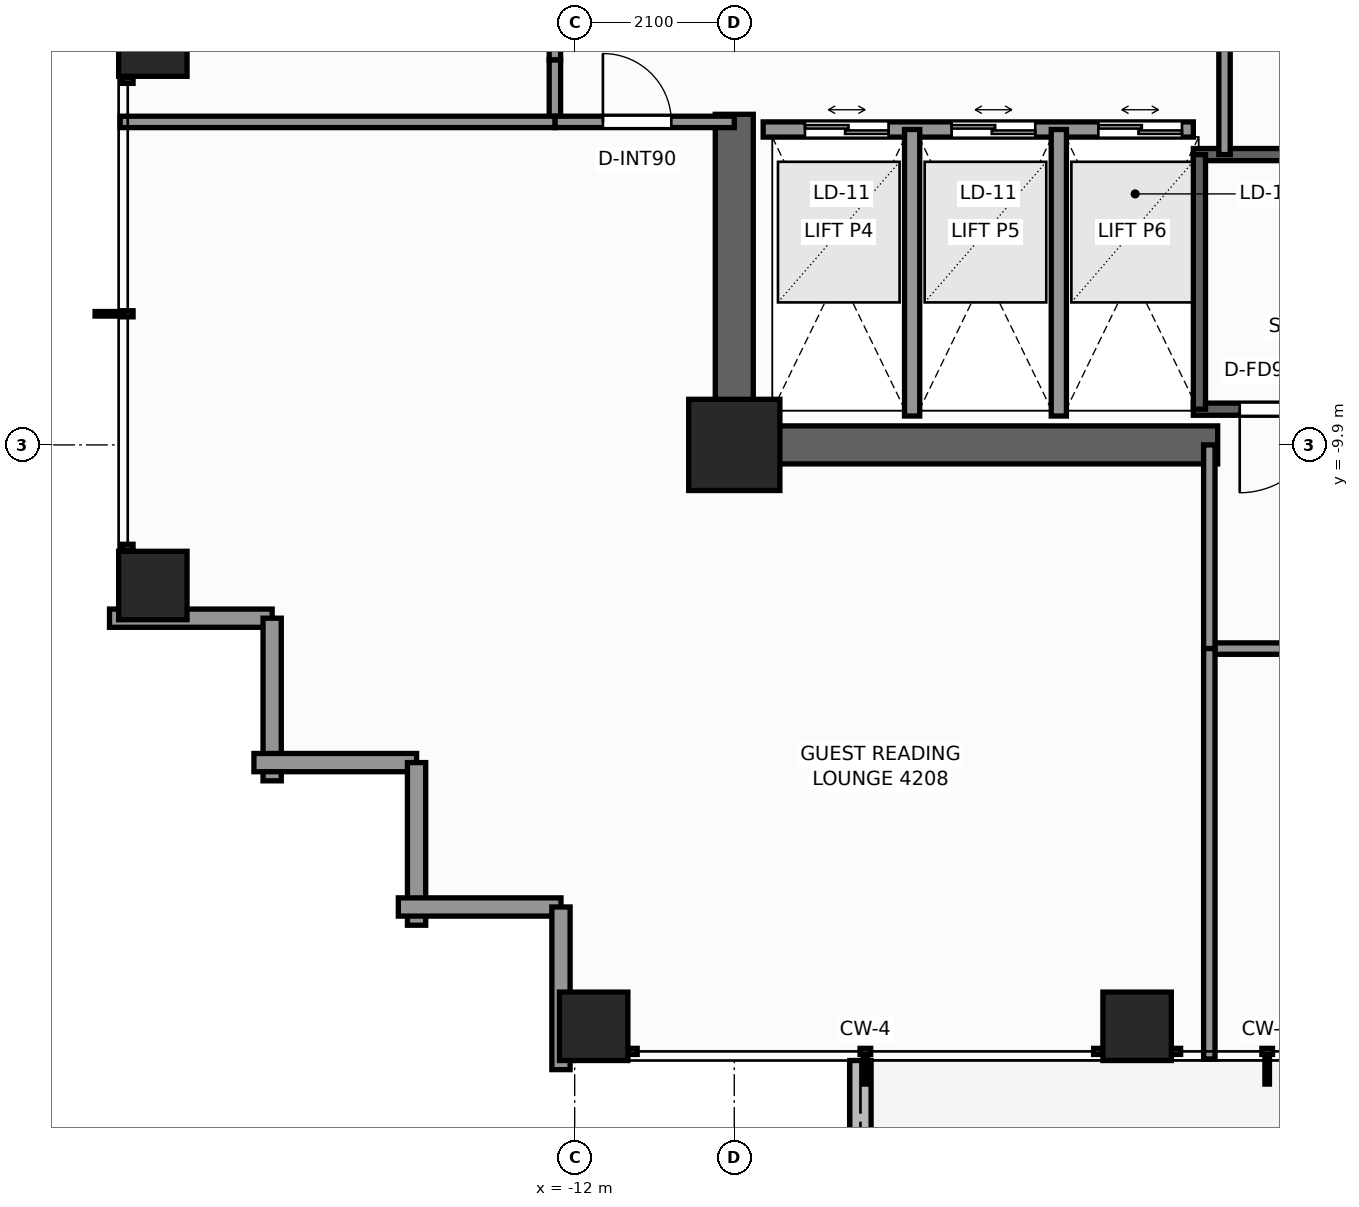
"""IFC4 building model, lengths in metres.
Left out: names, types, materials, properties, quantities, classifications, styles, units other than length and angle.
Written with IfcOpenShell. Run it as: python <this file> out.ifc"""

import sys

from ifc_helpers import new_model, si_unit, direction, frame, frame_2d, origin, origin_2d, place, context, subcontext, project, spatial, rectangle, extrude, element, fill, save


model = new_model("IFC4")
c1 = context("Model", 3, precision=1e-05, world=origin(), true_north=direction((0.0, 1.0)))
c2 = subcontext(c1, "Body", "Model", "MODEL_VIEW")
j1 = project(units=[si_unit("LENGTHUNIT", "METRE"), si_unit("PLANEANGLEUNIT", "RADIAN")], contexts=[c1])
p1 = place(None, origin())
s1 = spatial("IfcSite", under=j1, at=p1, CompositionType="ELEMENT")
p2 = place(p1, origin())
s2 = spatial("IfcBuilding", under=s1, at=p2, CompositionType="ELEMENT")
p3 = place(p2, frame((0.0, 0.0, 144.8)))
s3 = spatial("IfcBuildingStorey", under=s2, at=p3, CompositionType="ELEMENT", Elevation=144.8)
p4 = place(p3, frame((-3.54, -9.9, 0.0), z_axis=(0.0, 0.0, 1.0), x_axis=(-1.0, 0.0, 0.0)))
e1 = element("IfcWall", 1, at=p4, inside=s3, PredefinedType="SHEAR", context=c2, shape_type="SweptSolid", body=[
    extrude(rectangle(XDim=6.61, YDim=0.5, at=frame_2d((3.305, 0.0))), origin(), (0.0, 0.0, 1.0), 3.3),
])
p5 = place(p3, frame((-9.9, -9.65, 0.0), z_axis=(0.0, 0.0, 1.0), x_axis=(0.0, 1.0, 0.0)))
e2 = element("IfcWall", 2, at=p5, inside=s3, PredefinedType="SHEAR", context=c2, shape_type="SweptSolid", body=[
    extrude(rectangle(XDim=4.1, YDim=0.5, at=frame_2d((2.05, 0.0))), origin(), (0.0, 0.0, 1.0), 3.3),
])
p6 = place(p3, frame((-9.9, -9.9, 0.0), z_axis=(0.0, 0.0, 1.0), x_axis=(1.0, 0.0, 0.0)))
e3 = element("IfcColumn", 3, at=p6, inside=s3, PredefinedType="COLUMN", context=c2, shape_type="SweptSolid", body=[
    extrude(rectangle(XDim=1.2, YDim=1.2, at=origin_2d()), origin(), (0.0, 0.0, 1.0), 3.3),
])
for number, where, z_axis, x_axis in (
    (4, (-11.75, -17.55, 0.0), (0.0, 0.0, 1.0), (1.0, 0.0, 0.0)),
    (5, (-4.6, -17.55, 0.0), (0.0, 0.0, 1.0), (1.0, 0.0, 0.0)),
    (6, (-17.55, -11.75, 0.0), (0.0, 0.0, 1.0), (1.0, 0.0, 0.0)),
    (7, (-17.55, -4.6, 0.0), (0.0, 0.0, 1.0), (1.0, 0.0, 0.0)),
):
    element("IfcColumn", number, at=place(p3, frame(where, z_axis=z_axis, x_axis=x_axis)), inside=s3, PredefinedType="COLUMN", context=c2, shape_type="SweptSolid", body=[
        extrude(rectangle(XDim=0.9, YDim=0.9, at=origin_2d()), origin(), (0.0, 0.0, 1.0), 3.3),
    ])
p7 = place(p3, frame((-8.24, -18.0, -0.02), z_axis=(0.0, 0.0, 1.0), x_axis=(0.0, -1.0, 0.0)))
e8 = element("IfcWall", 8, at=p7, inside=s3, PredefinedType="PARAPET", context=c2, shape_type="SweptSolid", body=[
    extrude(rectangle(XDim=1.466, YDim=0.28, at=frame_2d((0.733, 0.0))), origin(), (0.0, 0.0, 1.0), 0.42),
])
for number, where, z_axis, x_axis in (
    (9, (-15.98, -12.18, 0.0), (0.0, 0.0, 1.0), (-1.0, 0.0, 0.0)),
    (10, (-15.98, -14.32, 0.0), (0.0, 0.0, 1.0), (0.0, 1.0, 0.0)),
):
    element("IfcWall", number, at=place(p3, frame(where, z_axis=z_axis, x_axis=x_axis)), inside=s3, PredefinedType="STANDARD", context=c2, shape_type="SweptSolid", body=[
        extrude(rectangle(XDim=2.14, YDim=0.24, at=frame_2d((1.07, 0.0))), origin(), (0.0, 0.0, 1.0), 2.329),
    ])
for number, where, z_axis, x_axis in (
    (11, (-14.08, -14.08, 0.0), (0.0, 0.0, 1.0), (-1.0, 0.0, 0.0)),
    (12, (-14.08, -16.22, 0.0), (0.0, 0.0, 1.0), (0.0, 1.0, 0.0)),
):
    element("IfcWall", number, at=place(p3, frame(where, z_axis=z_axis, x_axis=x_axis)), inside=s3, PredefinedType="STANDARD", context=c2, shape_type="SweptSolid", body=[
        extrude(rectangle(XDim=2.14, YDim=0.24, at=frame_2d((1.07, 0.0))), origin(), (0.0, 0.0, 1.0), 2.329),
    ])
for number, where, z_axis, x_axis in (
    (13, (-12.18, -15.98, 0.0), (0.0, 0.0, 1.0), (-1.0, 0.0, 0.0)),
    (14, (-12.18, -18.12, 0.0), (0.0, 0.0, 1.0), (0.0, 1.0, 0.0)),
):
    element("IfcWall", number, at=place(p3, frame(where, z_axis=z_axis, x_axis=x_axis)), inside=s3, PredefinedType="STANDARD", context=c2, shape_type="SweptSolid", body=[
        extrude(rectangle(XDim=2.14, YDim=0.24, at=frame_2d((1.07, 0.0))), origin(), (0.0, 0.0, 1.0), 2.329),
    ])
p8 = place(p3, frame((3.86, -9.43, 0.0), z_axis=(0.0, 0.0, 1.0), x_axis=(-1.0, 0.0, 0.0)))
e15 = element("IfcWall", 15, at=p8, inside=s3, PredefinedType="SHEAR", context=c2, shape_type="SweptSolid", body=[
    extrude(rectangle(XDim=7.72, YDim=0.16, at=frame_2d((3.86, 0.0))), origin(), (0.0, 0.0, 1.0), 3.3),
])
p9 = place(p8, frame((6.01, 0.0, 0.0)))
e16 = element("IfcOpeningElement", 16, at=p9, cuts=e15, PredefinedType="OPENING", context=c2, shape_type="SweptSolid", body=[
    extrude(rectangle(XDim=1.1, YDim=2.2, at=frame_2d((0.55, 1.1))), frame((0.0, 0.09, 0.0), z_axis=(0.0, -1.0, 0.0), x_axis=(1.0, 0.0, 0.0)), (0.0, 0.0, 1.0), 0.18),
])
p10 = place(p3, frame((-3.86, -6.08, 0.0), z_axis=(0.0, 0.0, 1.0), x_axis=(1.0, 0.0, 0.0)))
e17 = element("IfcWall", 17, at=p10, inside=s3, PredefinedType="SHEAR", context=c2, shape_type="SweptSolid", body=[
    extrude(rectangle(XDim=7.72, YDim=0.16, at=frame_2d((3.86, 0.0))), origin(), (0.0, 0.0, 1.0), 3.3),
])
p11 = place(p3, frame((-3.78, -9.43, 0.0), z_axis=(0.0, 0.0, 1.0), x_axis=(0.0, 1.0, 0.0)))
e18 = element("IfcWall", 18, at=p11, inside=s3, PredefinedType="SHEAR", context=c2, shape_type="SweptSolid", body=[
    extrude(rectangle(XDim=3.35, YDim=0.16, at=frame_2d((1.675, 0.0))), origin(), (0.0, 0.0, 1.0), 3.3),
])
p12 = place(p3, frame((-9.52, -5.75, 0.0), z_axis=(0.0, 0.0, 1.0), x_axis=(1.0, 0.0, 0.0)))
e19 = element("IfcWall", 19, at=p12, inside=s3, PredefinedType="SOLIDWALL", context=c2, shape_type="SweptSolid", body=[
    extrude(rectangle(XDim=5.66, YDim=0.2, at=frame_2d((2.83, 0.0))), origin(), (0.0, 0.0, 1.0), 2.95),
])
p13 = place(p12, frame((0.55, 0.0, 0.0)))
e20 = element("IfcOpeningElement", 20, at=p13, cuts=e19, PredefinedType="OPENING", context=c2, shape_type="SweptSolid", body=[
    extrude(rectangle(XDim=1.1, YDim=2.2, at=frame_2d((0.55, 1.1))), frame((0.0, 0.11, 0.0), z_axis=(0.0, -1.0, 0.0), x_axis=(1.0, 0.0, 0.0)), (0.0, 0.0, 1.0), 0.22),
])
p14 = place(p12, frame((2.48, 0.0, 0.0)))
e21 = element("IfcOpeningElement", 21, at=p14, cuts=e19, PredefinedType="OPENING", context=c2, shape_type="SweptSolid", body=[
    extrude(rectangle(XDim=1.1, YDim=2.2, at=frame_2d((0.55, 1.1))), frame((0.0, 0.11, 0.0), z_axis=(0.0, -1.0, 0.0), x_axis=(1.0, 0.0, 0.0)), (0.0, 0.0, 1.0), 0.22),
])
p15 = place(p12, frame((4.41, 0.0, 0.0)))
e22 = element("IfcOpeningElement", 22, at=p15, cuts=e19, PredefinedType="OPENING", context=c2, shape_type="SweptSolid", body=[
    extrude(rectangle(XDim=1.1, YDim=2.2, at=frame_2d((0.55, 1.1))), frame((0.0, 0.11, 0.0), z_axis=(0.0, -1.0, 0.0), x_axis=(1.0, 0.0, 0.0)), (0.0, 0.0, 1.0), 0.22),
])
for number, where, z_axis, x_axis in (
    (23, (-7.56, -9.52, 0.0), (0.0, 0.0, 1.0), (0.0, 1.0, 0.0)),
    (24, (-5.63, -9.52, 0.0), (0.0, 0.0, 1.0), (0.0, 1.0, 0.0)),
):
    element("IfcWall", number, at=place(p3, frame(where, z_axis=z_axis, x_axis=x_axis)), inside=s3, PredefinedType="SOLIDWALL", context=c2, shape_type="SweptSolid", body=[
        extrude(rectangle(XDim=3.77, YDim=0.2, at=frame_2d((1.885, 0.0))), origin(), (0.0, 0.0, 1.0), 2.95),
    ])
p16 = place(p3, frame((-3.45, -6.08, 0.0), z_axis=(0.0, 0.0, 1.0), x_axis=(0.0, 1.0, 0.0)))
e25 = element("IfcWall", 25, at=p16, inside=s3, PredefinedType="PARTITIONING", context=c2, shape_type="SweptSolid", body=[
    extrude(rectangle(XDim=2.36, YDim=0.15, at=frame_2d((1.18, 0.0))), origin(), (0.0, 0.0, 1.0), 2.95),
])
p17 = place(p3, frame((-3.65, -12.58, 0.0), z_axis=(0.0, 0.0, 1.0), x_axis=(1.0, 0.0, 0.0)))
e26 = element("IfcWall", 26, at=p17, inside=s3, PredefinedType="PARTITIONING", context=c2, shape_type="SweptSolid", body=[
    extrude(rectangle(XDim=8.017, YDim=0.15, at=frame_2d((4.009, 0.0))), origin(), (0.0, 0.0, 1.0), 2.475),
])
p18 = place(p17, frame((5.205, 0.0, 0.0)))
e27 = element("IfcOpeningElement", 27, at=p18, cuts=e26, PredefinedType="OPENING", context=c2, shape_type="SweptSolid", body=[
    extrude(rectangle(XDim=0.95, YDim=2.06, at=frame_2d((0.475, 1.03))), frame((0.0, 0.085, 0.0), z_axis=(0.0, -1.0, 0.0), x_axis=(1.0, 0.0, 0.0)), (0.0, 0.0, 1.0), 0.17),
])
p19 = place(p3, frame((-3.65, -12.58, 0.0), z_axis=(0.0, 0.0, 1.0), x_axis=(0.0, 1.0, 0.0)))
e28 = element("IfcWall", 28, at=p19, inside=s3, PredefinedType="PARTITIONING", context=c2, shape_type="SweptSolid", body=[
    extrude(rectangle(XDim=2.68, YDim=0.15, at=frame_2d((1.34, 0.0))), origin(), (0.0, 0.0, 1.0), 2.95),
])
p20 = place(p3, frame((-12.26, -5.65, 0.0), z_axis=(0.0, 0.0, 1.0), x_axis=(0.0, 1.0, 0.0)))
e29 = element("IfcWall", 29, at=p20, inside=s3, PredefinedType="PARTITIONING", context=c2, shape_type="SweptSolid", body=[
    extrude(rectangle(XDim=0.817, YDim=0.15, at=frame_2d((0.409, 0.0))), origin(), (0.0, 0.0, 1.0), 2.95),
])
p21 = place(p3, frame((-12.26, -4.833, 0.0), z_axis=(0.0, 0.0, 1.0), x_axis=(0.0, 1.0, 0.0)))
e30 = element("IfcWall", 30, at=p21, inside=s3, PredefinedType="PARTITIONING", context=c2, shape_type="SweptSolid", body=[
    extrude(rectangle(XDim=0.465, YDim=0.15, at=frame_2d((0.232, 0.0))), origin(), (0.0, 0.0, 1.0), 2.162),
])
p22 = place(p3, frame((-12.26, -5.65, 0.0), z_axis=(0.0, 0.0, 1.0), x_axis=(1.0, 0.0, 0.0)))
e31 = element("IfcWall", 31, at=p22, inside=s3, PredefinedType="PARTITIONING", context=c2, shape_type="SweptSolid", body=[
    extrude(rectangle(XDim=2.36, YDim=0.15, at=frame_2d((1.18, 0.0))), origin(), (0.0, 0.0, 1.0), 2.95),
])
p23 = place(p22, frame((0.632, 0.0, 0.0)))
e32 = element("IfcOpeningElement", 32, at=p23, cuts=e31, PredefinedType="OPENING", context=c2, shape_type="SweptSolid", body=[
    extrude(rectangle(XDim=0.9, YDim=2.06, at=frame_2d((0.45, 1.03))), frame((0.0, 0.085, 0.0), z_axis=(0.0, -1.0, 0.0), x_axis=(1.0, 0.0, 0.0)), (0.0, 0.0, 1.0), 0.17),
])
p24 = place(p3, frame((-17.98, -5.65, 0.0), z_axis=(0.0, 0.0, 1.0), x_axis=(1.0, 0.0, 0.0)))
e33 = element("IfcWall", 33, at=p24, inside=s3, PredefinedType="PARTITIONING", context=c2, shape_type="SweptSolid", body=[
    extrude(rectangle(XDim=5.72, YDim=0.15, at=frame_2d((2.86, 0.0))), origin(), (0.0, 0.0, 1.0), 2.319),
])
p25 = place(p3, frame((-3.65, -17.98, 0.0), z_axis=(0.0, 0.0, 1.0), x_axis=(0.0, 1.0, 0.0)))
e34 = element("IfcWall", 34, at=p25, inside=s3, PredefinedType="PARTITIONING", context=c2, shape_type="SweptSolid", body=[
    extrude(rectangle(XDim=5.4, YDim=0.15, at=frame_2d((2.7, 0.0))), origin(), (0.0, 0.0, 1.0), 2.319),
])
p26 = place(p9, origin())
e35 = element("IfcDoor", 35, at=p26, inside=s3, OperationType="SINGLE_SWING_RIGHT", PredefinedType="DOOR", context=c2, shape_type="SweptSolid", body=[
    extrude(rectangle(XDim=1.1, YDim=2.2, at=frame_2d((0.55, 1.1))), frame((0.0, 0.025, 0.0), z_axis=(0.0, -1.0, 0.0), x_axis=(1.0, 0.0, 0.0)), (0.0, 0.0, 1.0), 0.05),
])
fill(e16, e35)
p27 = place(p13, origin())
e36 = element("IfcDoor", 36, at=p27, inside=s3, OperationType="DOUBLE_DOOR_SLIDING", PredefinedType="DOOR", context=c2, shape_type="SweptSolid", body=[
    extrude(rectangle(XDim=1.1, YDim=2.2, at=frame_2d((0.55, 1.1))), frame((0.0, 0.025, 0.0), z_axis=(0.0, -1.0, 0.0), x_axis=(1.0, 0.0, 0.0)), (0.0, 0.0, 1.0), 0.05),
])
fill(e20, e36)
p28 = place(p14, origin())
e37 = element("IfcDoor", 37, at=p28, inside=s3, OperationType="DOUBLE_DOOR_SLIDING", PredefinedType="DOOR", context=c2, shape_type="SweptSolid", body=[
    extrude(rectangle(XDim=1.1, YDim=2.2, at=frame_2d((0.55, 1.1))), frame((0.0, 0.025, 0.0), z_axis=(0.0, -1.0, 0.0), x_axis=(1.0, 0.0, 0.0)), (0.0, 0.0, 1.0), 0.05),
])
fill(e21, e37)
p29 = place(p15, origin())
e38 = element("IfcDoor", 38, at=p29, inside=s3, OperationType="DOUBLE_DOOR_SLIDING", PredefinedType="DOOR", context=c2, shape_type="SweptSolid", body=[
    extrude(rectangle(XDim=1.1, YDim=2.2, at=frame_2d((0.55, 1.1))), frame((0.0, 0.025, 0.0), z_axis=(0.0, -1.0, 0.0), x_axis=(1.0, 0.0, 0.0)), (0.0, 0.0, 1.0), 0.05),
])
fill(e22, e38)
p30 = place(p23, origin())
e39 = element("IfcDoor", 39, at=p30, inside=s3, OperationType="SINGLE_SWING_LEFT", PredefinedType="DOOR", context=c2, shape_type="SweptSolid", body=[
    extrude(rectangle(XDim=0.9, YDim=2.06, at=frame_2d((0.45, 1.03))), frame((0.0, 0.025, 0.0), z_axis=(0.0, -1.0, 0.0), x_axis=(1.0, 0.0, 0.0)), (0.0, 0.0, 1.0), 0.05),
])
fill(e32, e39)
save(model, sys.argv[1])
